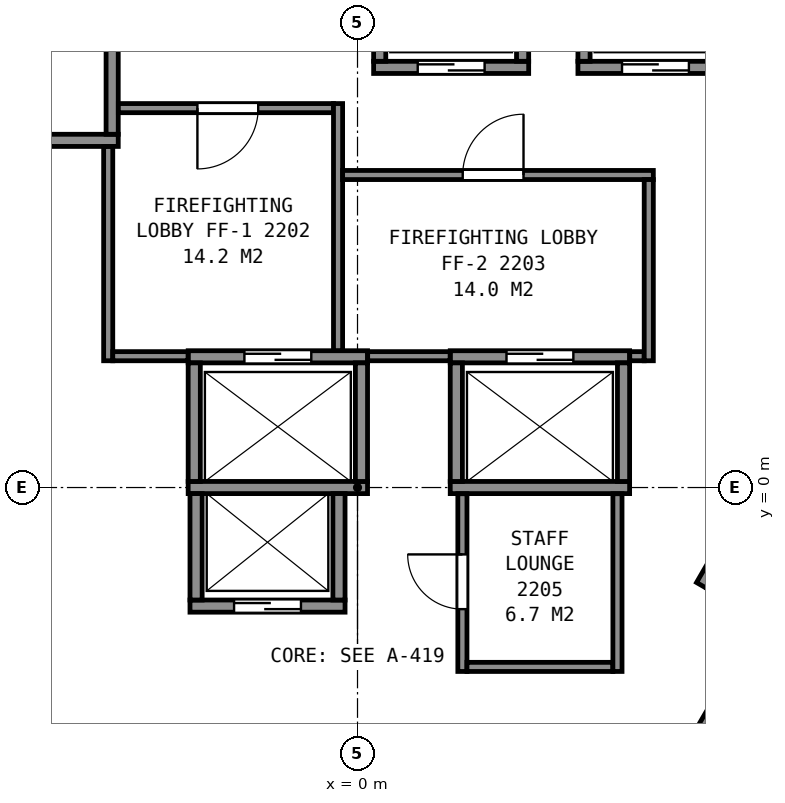
"""IFC4 building model, lengths in metres.
Left out: names, types, materials, properties, quantities, classifications, styles, units other than length and angle.
Written with IfcOpenShell. Run it as: python <this file> out.ifc"""

import sys

from ifc_helpers import new_model, si_unit, direction, frame, frame_2d, origin, place, context, subcontext, project, spatial, rectangle, extrude, element, fill, save


model = new_model("IFC4")
c1 = context("Model", 3, precision=1e-05, world=origin(), true_north=direction((0.0, 1.0)))
c2 = subcontext(c1, "Body", "Model", "MODEL_VIEW")
j1 = project(units=[si_unit("LENGTHUNIT", "METRE"), si_unit("PLANEANGLEUNIT", "RADIAN")], contexts=[c1])
p1 = place(None, origin())
s1 = spatial("IfcSite", under=j1, at=p1, CompositionType="ELEMENT")
p2 = place(p1, origin())
s2 = spatial("IfcBuilding", under=s1, at=p2, CompositionType="ELEMENT")
p3 = place(p2, frame((0.0, 0.0, 96.4)))
s3 = spatial("IfcBuildingStorey", under=s2, at=p3, CompositionType="ELEMENT", Elevation=96.4)
p4 = place(p3, frame((-2.755, -1.95, 0.0), z_axis=(0.0, 0.0, 1.0), x_axis=(1.0, 0.0, 0.0)))
e1 = element("IfcWall", 1, at=p4, inside=s3, PredefinedType="PARTITIONING", context=c2, shape_type="SweptSolid", body=[
    extrude(rectangle(XDim=2.55, YDim=0.2, at=frame_2d((1.275, 0.0))), origin(), (0.0, 0.0, 1.0), 3.6),
])
p5 = place(p4, frame((0.725, 0.0, 0.0)))
e2 = element("IfcOpeningElement", 2, at=p5, cuts=e1, PredefinedType="OPENING", context=c2, shape_type="SweptSolid", body=[
    extrude(rectangle(XDim=1.1, YDim=2.1, at=frame_2d((0.55, 1.05))), frame((0.0, 0.11, 0.0), z_axis=(0.0, -1.0, 0.0), x_axis=(1.0, 0.0, 0.0)), (0.0, 0.0, 1.0), 0.22),
])
p6 = place(p3, frame((-2.785, 0.0, 0.0), z_axis=(0.0, 0.0, 1.0), x_axis=(1.0, 0.0, 0.0)))
e3 = element("IfcWall", 3, at=p6, inside=s3, PredefinedType="PARTITIONING", context=c2, shape_type="SweptSolid", body=[
    extrude(rectangle(XDim=2.95, YDim=0.2, at=frame_2d((1.475, 0.0))), origin(), (0.0, 0.0, 1.0), 3.6),
])
p7 = place(p3, frame((1.525, 0.0, 0.0), z_axis=(0.0, 0.0, 1.0), x_axis=(1.0, 0.0, 0.0)))
e4 = element("IfcWall", 4, at=p7, inside=s3, PredefinedType="PARTITIONING", context=c2, shape_type="SweptSolid", body=[
    extrude(rectangle(XDim=2.95, YDim=0.2, at=frame_2d((1.475, 0.0))), origin(), (0.0, 0.0, 1.0), 3.6),
])
p8 = place(p3, frame((-2.785, 2.15, 0.0), z_axis=(0.0, 0.0, 1.0), x_axis=(1.0, 0.0, 0.0)))
e5 = element("IfcWall", 5, at=p8, inside=s3, PredefinedType="PARTITIONING", context=c2, shape_type="SweptSolid", body=[
    extrude(rectangle(XDim=2.95, YDim=0.2, at=frame_2d((1.475, 0.0))), origin(), (0.0, 0.0, 1.0), 3.6),
])
p9 = place(p8, frame((0.925, 0.0, 0.0)))
e6 = element("IfcOpeningElement", 6, at=p9, cuts=e5, PredefinedType="OPENING", context=c2, shape_type="SweptSolid", body=[
    extrude(rectangle(XDim=1.1, YDim=2.1, at=frame_2d((0.55, 1.05))), frame((0.0, 0.11, 0.0), z_axis=(0.0, -1.0, 0.0), x_axis=(1.0, 0.0, 0.0)), (0.0, 0.0, 1.0), 0.22),
])
p10 = place(p3, frame((1.525, 2.15, 0.0), z_axis=(0.0, 0.0, 1.0), x_axis=(1.0, 0.0, 0.0)))
e7 = element("IfcWall", 7, at=p10, inside=s3, PredefinedType="PARTITIONING", context=c2, shape_type="SweptSolid", body=[
    extrude(rectangle(XDim=2.95, YDim=0.2, at=frame_2d((1.475, 0.0))), origin(), (0.0, 0.0, 1.0), 3.6),
])
p11 = place(p10, frame((0.925, 0.0, 0.0)))
e8 = element("IfcOpeningElement", 8, at=p11, cuts=e7, PredefinedType="OPENING", context=c2, shape_type="SweptSolid", body=[
    extrude(rectangle(XDim=1.1, YDim=2.1, at=frame_2d((0.55, 1.05))), frame((0.0, 0.11, 0.0), z_axis=(0.0, -1.0, 0.0), x_axis=(1.0, 0.0, 0.0)), (0.0, 0.0, 1.0), 0.22),
])
p12 = place(p3, frame((-6.285, 5.71, 0.0), z_axis=(0.0, 0.0, 1.0), x_axis=(1.0, 0.0, 0.0)))
e9 = element("IfcWall", 9, at=p12, inside=s3, PredefinedType="PARTITIONING", context=c2, shape_type="SweptSolid", body=[
    extrude(rectangle(XDim=2.35, YDim=0.2, at=frame_2d((1.175, 0.0))), origin(), (0.0, 0.0, 1.0), 3.6),
])
p13 = place(p3, frame((0.265, 6.91, 0.0), z_axis=(0.0, 0.0, 1.0), x_axis=(1.0, 0.0, 0.0)))
e10 = element("IfcWall", 10, at=p13, inside=s3, PredefinedType="PARTITIONING", context=c2, shape_type="SweptSolid", body=[
    extrude(rectangle(XDim=2.55, YDim=0.2, at=frame_2d((1.275, 0.0))), origin(), (0.0, 0.0, 1.0), 3.6),
])
p14 = place(p13, frame((0.725, 0.0, 0.0)))
e11 = element("IfcOpeningElement", 11, at=p14, cuts=e10, PredefinedType="OPENING", context=c2, shape_type="SweptSolid", body=[
    extrude(rectangle(XDim=1.1, YDim=2.1, at=frame_2d((0.55, 1.05))), frame((0.0, 0.11, 0.0), z_axis=(0.0, -1.0, 0.0), x_axis=(1.0, 0.0, 0.0)), (0.0, 0.0, 1.0), 0.22),
])
p15 = place(p3, frame((3.625, 6.91, 0.0), z_axis=(0.0, 0.0, 1.0), x_axis=(1.0, 0.0, 0.0)))
e12 = element("IfcWall", 12, at=p15, inside=s3, PredefinedType="PARTITIONING", context=c2, shape_type="SweptSolid", body=[
    extrude(rectangle(XDim=2.55, YDim=0.2, at=frame_2d((1.275, 0.0))), origin(), (0.0, 0.0, 1.0), 3.6),
])
p16 = place(p15, frame((0.725, 0.0, 0.0)))
e13 = element("IfcOpeningElement", 13, at=p16, cuts=e12, PredefinedType="OPENING", context=c2, shape_type="SweptSolid", body=[
    extrude(rectangle(XDim=1.1, YDim=2.1, at=frame_2d((0.55, 1.05))), frame((0.0, 0.11, 0.0), z_axis=(0.0, -1.0, 0.0), x_axis=(1.0, 0.0, 0.0)), (0.0, 0.0, 1.0), 0.22),
])
p17 = place(p3, frame((5.527, -4.247, 0.0), z_axis=(0.0, 0.0, 1.0), x_axis=(0.499938297808, 0.866061024631, 0.0)))
e14 = element("IfcWall", 14, at=p17, inside=s3, PredefinedType="PARTITIONING", context=c2, shape_type="SweptSolid", body=[
    extrude(rectangle(XDim=2.35, YDim=0.2, at=frame_2d((1.175, 0.0))), origin(), (0.0, 0.0, 1.0), 3.6),
])
p18 = place(p17, frame((0.725, 0.0, 0.0)))
e15 = element("IfcOpeningElement", 15, at=p18, cuts=e14, PredefinedType="OPENING", context=c2, shape_type="SweptSolid", body=[
    extrude(rectangle(XDim=1.1, YDim=2.1, at=frame_2d((0.55, 1.05))), frame((0.0, 0.11, 0.0), z_axis=(0.0, -1.0, 0.0), x_axis=(1.0, 0.0, 0.0)), (0.0, 0.0, 1.0), 0.22),
])
p19 = place(p3, frame((5.663, -1.612, 0.0), z_axis=(0.0, 0.0, 1.0), x_axis=(0.49998122708, 0.866036242063, 0.0)))
e16 = element("IfcWall", 16, at=p19, inside=s3, PredefinedType="PARTITIONING", context=c2, shape_type="SweptSolid", body=[
    extrude(rectangle(XDim=4.9, YDim=0.2, at=frame_2d((2.45, 0.0))), origin(), (0.0, 0.0, 1.0), 3.6),
])
p20 = place(p3, frame((4.375, 0.1, 0.0), z_axis=(0.0, 0.0, 1.0), x_axis=(0.0, 1.0, 0.0)))
e17 = element("IfcWall", 17, at=p20, inside=s3, PredefinedType="PARTITIONING", context=c2, shape_type="SweptSolid", body=[
    extrude(rectangle(XDim=1.95, YDim=0.2, at=frame_2d((0.975, 0.0))), origin(), (0.0, 0.0, 1.0), 3.6),
])
for number, where, z_axis, x_axis in (
    (18, (3.725, 7.01, 0.0), (0.0, 0.0, 1.0), (0.0, 1.0, 0.0)),
    (19, (2.715, 7.01, 0.0), (0.0, 0.0, 1.0), (0.0, 1.0, 0.0)),
):
    element("IfcWall", number, at=place(p3, frame(where, z_axis=z_axis, x_axis=x_axis)), inside=s3, PredefinedType="PARTITIONING", context=c2, shape_type="SweptSolid", body=[
        extrude(rectangle(XDim=1.75, YDim=0.2, at=frame_2d((0.875, 0.0))), origin(), (0.0, 0.0, 1.0), 3.6),
    ])
p21 = place(p3, frame((1.625, 0.1, 0.0), z_axis=(0.0, 0.0, 1.0), x_axis=(0.0, 1.0, 0.0)))
e20 = element("IfcWall", 20, at=p21, inside=s3, PredefinedType="PARTITIONING", context=c2, shape_type="SweptSolid", body=[
    extrude(rectangle(XDim=1.95, YDim=0.2, at=frame_2d((0.975, 0.0))), origin(), (0.0, 0.0, 1.0), 3.6),
])
p22 = place(p3, frame((0.365, 7.01, 0.0), z_axis=(0.0, 0.0, 1.0), x_axis=(0.0, 1.0, 0.0)))
e21 = element("IfcWall", 21, at=p22, inside=s3, PredefinedType="PARTITIONING", context=c2, shape_type="SweptSolid", body=[
    extrude(rectangle(XDim=1.75, YDim=0.2, at=frame_2d((0.875, 0.0))), origin(), (0.0, 0.0, 1.0), 3.6),
])
p23 = place(p3, frame((0.065, 0.1, 0.0), z_axis=(0.0, 0.0, 1.0), x_axis=(0.0, 1.0, 0.0)))
e22 = element("IfcWall", 22, at=p23, inside=s3, PredefinedType="PARTITIONING", context=c2, shape_type="SweptSolid", body=[
    extrude(rectangle(XDim=1.95, YDim=0.2, at=frame_2d((0.975, 0.0))), origin(), (0.0, 0.0, 1.0), 3.6),
])
for number, where, z_axis, x_axis in (
    (23, (-0.305, -1.85, 0.0), (0.0, 0.0, 1.0), (0.0, 1.0, 0.0)),
    (24, (-2.655, -1.85, 0.0), (0.0, 0.0, 1.0), (0.0, 1.0, 0.0)),
):
    element("IfcWall", number, at=place(p3, frame(where, z_axis=z_axis, x_axis=x_axis)), inside=s3, PredefinedType="PARTITIONING", context=c2, shape_type="SweptSolid", body=[
        extrude(rectangle(XDim=1.75, YDim=0.2, at=frame_2d((0.875, 0.0))), origin(), (0.0, 0.0, 1.0), 3.6),
    ])
p24 = place(p3, frame((-2.685, 0.1, 0.0), z_axis=(0.0, 0.0, 1.0), x_axis=(0.0, 1.0, 0.0)))
e25 = element("IfcWall", 25, at=p24, inside=s3, PredefinedType="PARTITIONING", context=c2, shape_type="SweptSolid", body=[
    extrude(rectangle(XDim=1.95, YDim=0.2, at=frame_2d((0.975, 0.0))), origin(), (0.0, 0.0, 1.0), 3.6),
])
p25 = place(p3, frame((-4.035, 5.81, 0.0), z_axis=(0.0, 0.0, 1.0), x_axis=(0.0, 1.0, 0.0)))
e26 = element("IfcWall", 26, at=p25, inside=s3, PredefinedType="PARTITIONING", context=c2, shape_type="SweptSolid", body=[
    extrude(rectangle(XDim=1.75, YDim=0.2, at=frame_2d((0.875, 0.0))), origin(), (0.0, 0.0, 1.0), 3.6),
])
p26 = place(p3, frame((-13.664, 5.946, 0.0), z_axis=(0.0, 0.0, 1.0), x_axis=(0.499994327219, -0.866028678941, 0.0)))
e27 = element("IfcWall", 27, at=p26, inside=s3, PredefinedType="PARTITIONING", context=c2, shape_type="SweptSolid", body=[
    extrude(rectangle(XDim=23.968, YDim=0.2, at=frame_2d((11.984, 0.0))), origin(), (0.0, 0.0, 1.0), 3.35),
])
p27 = place(p3, frame((-4.278, -5.512, 0.0), z_axis=(0.0, 0.0, 1.0), x_axis=(-0.499933120428, 0.86606401328, 0.0)))
e28 = element("IfcWall", 28, at=p27, inside=s3, PredefinedType="PARTITIONING", context=c2, shape_type="SweptSolid", body=[
    extrude(rectangle(XDim=3.377, YDim=0.15, at=frame_2d((1.689, 0.0))), origin(), (0.0, 0.0, 1.0), 3.35),
])
p28 = place(p27, frame((2.177, 0.0, 0.0)))
e29 = element("IfcOpeningElement", 29, at=p28, cuts=e28, PredefinedType="OPENING", context=c2, shape_type="SweptSolid", body=[
    extrude(rectangle(XDim=0.9, YDim=2.1, at=frame_2d((0.45, 1.05))), frame((0.0, 0.085, 0.0), z_axis=(0.0, -1.0, 0.0), x_axis=(1.0, 0.0, 0.0)), (0.0, 0.0, 1.0), 0.17),
])
p29 = place(p27, frame((0.525, 0.0, 0.0)))
e30 = element("IfcOpeningElement", 30, at=p29, cuts=e28, PredefinedType="OPENING", context=c2, shape_type="SweptSolid", body=[
    extrude(rectangle(XDim=0.9, YDim=2.1, at=frame_2d((0.45, 1.05))), frame((0.0, 0.085, 0.0), z_axis=(0.0, -1.0, 0.0), x_axis=(1.0, 0.0, 0.0)), (0.0, 0.0, 1.0), 0.17),
])
p30 = place(p3, frame((-4.1, 2.085, 0.0), z_axis=(0.0, 0.0, 1.0), x_axis=(0.0, 1.0, 0.0)))
e31 = element("IfcWall", 31, at=p30, inside=s3, PredefinedType="PARTITIONING", context=c2, shape_type="SweptSolid", body=[
    extrude(rectangle(XDim=3.523, YDim=0.15, at=frame_2d((1.761, 0.0))), origin(), (0.0, 0.0, 1.0), 3.35),
])
p31 = place(p3, frame((-4.025, 2.16, 0.0), z_axis=(0.0, 0.0, 1.0), x_axis=(1.0, 0.0, 0.0)))
e32 = element("IfcWall", 32, at=p31, inside=s3, PredefinedType="PARTITIONING", context=c2, shape_type="SweptSolid", body=[
    extrude(rectangle(XDim=1.238, YDim=0.15, at=frame_2d((0.619, 0.0))), origin(), (0.0, 0.0, 1.0), 3.35),
])
p32 = place(p3, frame((-3.933, 6.24, 0.0), z_axis=(0.0, 0.0, 1.0), x_axis=(1.0, 0.0, 0.0)))
e33 = element("IfcWall", 33, at=p32, inside=s3, PredefinedType="PARTITIONING", context=c2, shape_type="SweptSolid", body=[
    extrude(rectangle(XDim=3.538, YDim=0.15, at=frame_2d((1.769, 0.0))), origin(), (0.0, 0.0, 1.0), 3.35),
])
p33 = place(p32, frame((1.3, 0.0, 0.0)))
e34 = element("IfcOpeningElement", 34, at=p33, cuts=e33, PredefinedType="OPENING", context=c2, shape_type="SweptSolid", body=[
    extrude(rectangle(XDim=1.0, YDim=2.1, at=frame_2d((0.5, 1.05))), frame((0.0, 0.085, 0.0), z_axis=(0.0, -1.0, 0.0), x_axis=(1.0, 0.0, 0.0)), (0.0, 0.0, 1.0), 0.17),
])
p34 = place(p3, frame((-0.32, 2.252, 0.0), z_axis=(0.0, 0.0, 1.0), x_axis=(0.0, 1.0, 0.0)))
e35 = element("IfcWall", 35, at=p34, inside=s3, PredefinedType="PARTITIONING", context=c2, shape_type="SweptSolid", body=[
    extrude(rectangle(XDim=4.063, YDim=0.15, at=frame_2d((2.031, 0.0))), origin(), (0.0, 0.0, 1.0), 3.35),
])
p35 = place(p3, frame((-0.245, 5.14, 0.0), z_axis=(0.0, 0.0, 1.0), x_axis=(1.0, 0.0, 0.0)))
e36 = element("IfcWall", 36, at=p35, inside=s3, PredefinedType="PARTITIONING", context=c2, shape_type="SweptSolid", body=[
    extrude(rectangle(XDim=5.11, YDim=0.15, at=frame_2d((2.555, 0.0))), origin(), (0.0, 0.0, 1.0), 3.35),
])
p36 = place(p35, frame((1.975, 0.0, 0.0)))
e37 = element("IfcOpeningElement", 37, at=p36, cuts=e36, PredefinedType="OPENING", context=c2, shape_type="SweptSolid", body=[
    extrude(rectangle(XDim=1.0, YDim=2.1, at=frame_2d((0.5, 1.05))), frame((0.0, 0.085, 0.0), z_axis=(0.0, -1.0, 0.0), x_axis=(1.0, 0.0, 0.0)), (0.0, 0.0, 1.0), 0.17),
])
p37 = place(p3, frame((0.167, 2.16, 0.0), z_axis=(0.0, 0.0, 1.0), x_axis=(1.0, 0.0, 0.0)))
e38 = element("IfcWall", 38, at=p37, inside=s3, PredefinedType="PARTITIONING", context=c2, shape_type="SweptSolid", body=[
    extrude(rectangle(XDim=1.356, YDim=0.15, at=frame_2d((0.678, 0.0))), origin(), (0.0, 0.0, 1.0), 3.35),
])
p38 = place(p3, frame((1.725, -0.102, 0.0), z_axis=(0.0, 0.0, 1.0), x_axis=(0.0, -1.0, 0.0)))
e39 = element("IfcWall", 39, at=p38, inside=s3, PredefinedType="PARTITIONING", context=c2, shape_type="SweptSolid", body=[
    extrude(rectangle(XDim=2.923, YDim=0.15, at=frame_2d((1.461, 0.0))), origin(), (0.0, 0.0, 1.0), 3.35),
])
p39 = place(p38, frame((0.998, 0.0, 0.0)))
e40 = element("IfcOpeningElement", 40, at=p39, cuts=e39, PredefinedType="OPENING", context=c2, shape_type="SweptSolid", body=[
    extrude(rectangle(XDim=0.9, YDim=2.1, at=frame_2d((0.45, 1.05))), frame((0.0, 0.085, 0.0), z_axis=(0.0, -1.0, 0.0), x_axis=(1.0, 0.0, 0.0)), (0.0, 0.0, 1.0), 0.17),
])
p40 = place(p3, frame((1.8, -2.95, 0.0), z_axis=(0.0, 0.0, 1.0), x_axis=(1.0, 0.0, 0.0)))
e41 = element("IfcWall", 41, at=p40, inside=s3, PredefinedType="PARTITIONING", context=c2, shape_type="SweptSolid", body=[
    extrude(rectangle(XDim=2.4, YDim=0.15, at=frame_2d((1.2, 0.0))), origin(), (0.0, 0.0, 1.0), 3.35),
])
p41 = place(p3, frame((4.275, -3.025, 0.0), z_axis=(0.0, 0.0, 1.0), x_axis=(0.0, 1.0, 0.0)))
e42 = element("IfcWall", 42, at=p41, inside=s3, PredefinedType="PARTITIONING", context=c2, shape_type="SweptSolid", body=[
    extrude(rectangle(XDim=2.923, YDim=0.15, at=frame_2d((1.461, 0.0))), origin(), (0.0, 0.0, 1.0), 3.35),
])
p42 = place(p3, frame((4.477, 2.16, 0.0), z_axis=(0.0, 0.0, 1.0), x_axis=(1.0, 0.0, 0.0)))
e43 = element("IfcWall", 43, at=p42, inside=s3, PredefinedType="PARTITIONING", context=c2, shape_type="SweptSolid", body=[
    extrude(rectangle(XDim=0.238, YDim=0.15, at=frame_2d((0.119, 0.0))), origin(), (0.0, 0.0, 1.0), 3.35),
])
p43 = place(p3, frame((4.79, 2.085, 0.0), z_axis=(0.0, 0.0, 1.0), x_axis=(0.0, 1.0, 0.0)))
e44 = element("IfcWall", 44, at=p43, inside=s3, PredefinedType="PARTITIONING", context=c2, shape_type="SweptSolid", body=[
    extrude(rectangle(XDim=2.98, YDim=0.15, at=frame_2d((1.49, 0.0))), origin(), (0.0, 0.0, 1.0), 3.35),
])
p44 = place(p14, origin())
e45 = element("IfcDoor", 45, at=p44, inside=s3, OperationType="SLIDING_TO_LEFT", PredefinedType="DOOR", context=c2, shape_type="SweptSolid", body=[
    extrude(rectangle(XDim=1.1, YDim=2.1, at=frame_2d((0.55, 1.05))), frame((0.0, 0.025, 0.0), z_axis=(0.0, -1.0, 0.0), x_axis=(1.0, 0.0, 0.0)), (0.0, 0.0, 1.0), 0.05),
])
fill(e11, e45)
p45 = place(p5, origin())
e46 = element("IfcDoor", 46, at=p45, inside=s3, OperationType="SLIDING_TO_RIGHT", PredefinedType="DOOR", context=c2, shape_type="SweptSolid", body=[
    extrude(rectangle(XDim=1.1, YDim=2.1, at=frame_2d((0.55, 1.05))), frame((0.0, 0.025, 0.0), z_axis=(0.0, -1.0, 0.0), x_axis=(1.0, 0.0, 0.0)), (0.0, 0.0, 1.0), 0.05),
])
fill(e2, e46)
p46 = place(p16, origin())
e47 = element("IfcDoor", 47, at=p46, inside=s3, OperationType="SLIDING_TO_LEFT", PredefinedType="DOOR", context=c2, shape_type="SweptSolid", body=[
    extrude(rectangle(XDim=1.1, YDim=2.1, at=frame_2d((0.55, 1.05))), frame((0.0, 0.025, 0.0), z_axis=(0.0, -1.0, 0.0), x_axis=(1.0, 0.0, 0.0)), (0.0, 0.0, 1.0), 0.05),
])
fill(e13, e47)
p47 = place(p9, origin())
e48 = element("IfcDoor", 48, at=p47, inside=s3, OperationType="SLIDING_TO_LEFT", PredefinedType="DOOR", context=c2, shape_type="SweptSolid", body=[
    extrude(rectangle(XDim=1.1, YDim=2.1, at=frame_2d((0.55, 1.05))), frame((0.0, 0.025, 0.0), z_axis=(0.0, -1.0, 0.0), x_axis=(1.0, 0.0, 0.0)), (0.0, 0.0, 1.0), 0.05),
])
fill(e6, e48)
p48 = place(p11, origin())
e49 = element("IfcDoor", 49, at=p48, inside=s3, OperationType="SLIDING_TO_RIGHT", PredefinedType="DOOR", context=c2, shape_type="SweptSolid", body=[
    extrude(rectangle(XDim=1.1, YDim=2.1, at=frame_2d((0.55, 1.05))), frame((0.0, 0.025, 0.0), z_axis=(0.0, -1.0, 0.0), x_axis=(1.0, 0.0, 0.0)), (0.0, 0.0, 1.0), 0.05),
])
fill(e8, e49)
p49 = place(p33, origin())
e50 = element("IfcDoor", 50, at=p49, inside=s3, OperationType="SINGLE_SWING_LEFT", PredefinedType="DOOR", context=c2, shape_type="SweptSolid", body=[
    extrude(rectangle(XDim=1.0, YDim=2.1, at=frame_2d((0.5, 1.05))), frame((0.0, 0.025, 0.0), z_axis=(0.0, -1.0, 0.0), x_axis=(1.0, 0.0, 0.0)), (0.0, 0.0, 1.0), 0.05),
])
fill(e34, e50)
p50 = place(p36, origin())
e51 = element("IfcDoor", 51, at=p50, inside=s3, OperationType="SINGLE_SWING_RIGHT", PredefinedType="DOOR", context=c2, shape_type="SweptSolid", body=[
    extrude(rectangle(XDim=1.0, YDim=2.1, at=frame_2d((0.5, 1.05))), frame((0.0, 0.025, 0.0), z_axis=(0.0, -1.0, 0.0), x_axis=(1.0, 0.0, 0.0)), (0.0, 0.0, 1.0), 0.05),
])
fill(e37, e51)
p51 = place(p39, origin())
e52 = element("IfcDoor", 52, at=p51, inside=s3, OperationType="SINGLE_SWING_LEFT", PredefinedType="DOOR", context=c2, shape_type="SweptSolid", body=[
    extrude(rectangle(XDim=0.9, YDim=2.1, at=frame_2d((0.45, 1.05))), frame((0.0, 0.025, 0.0), z_axis=(0.0, -1.0, 0.0), x_axis=(1.0, 0.0, 0.0)), (0.0, 0.0, 1.0), 0.05),
])
fill(e40, e52)
save(model, sys.argv[1])
